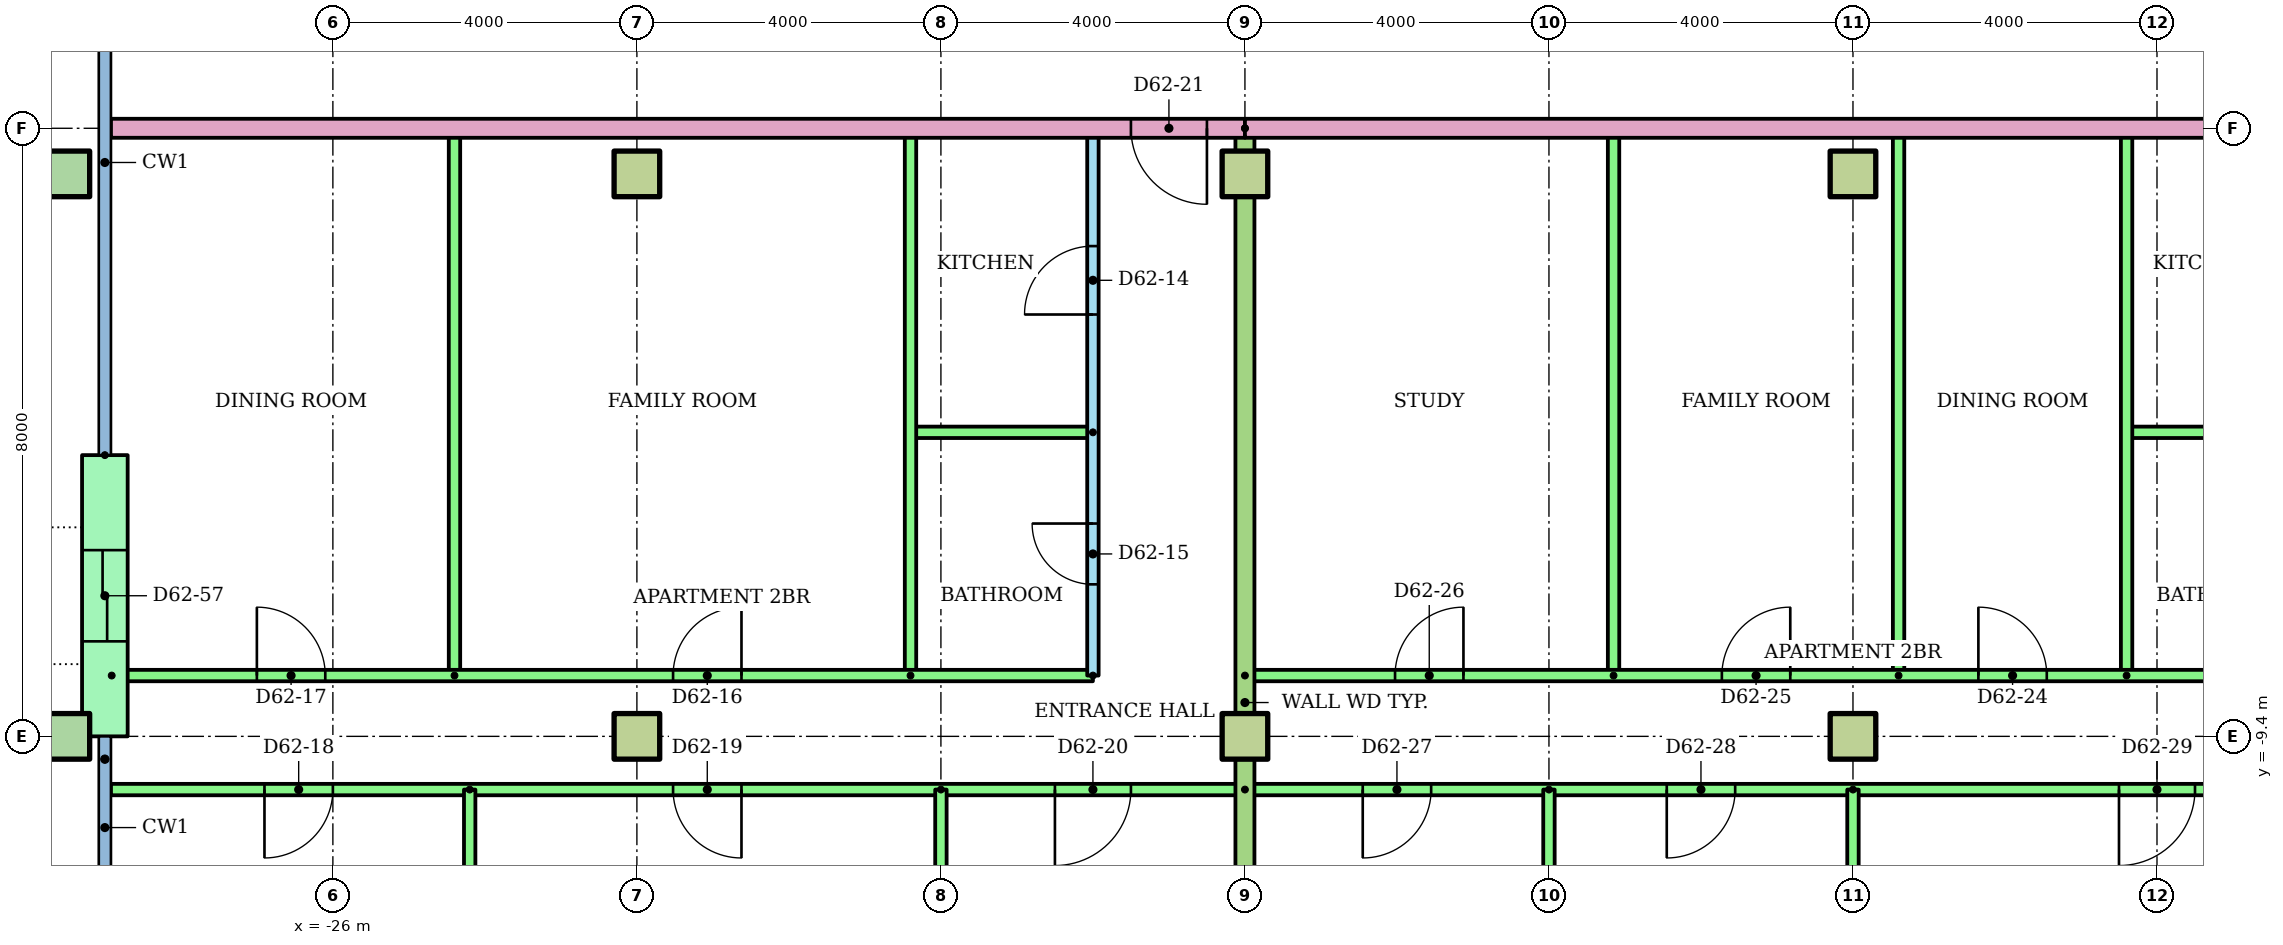
"""IFC4 building model, lengths in metres.
Left out: names, types, materials, properties, quantities, classifications, styles, units other than length and angle.
Written with IfcOpenShell. Run it as: python <this file> out.ifc"""

import sys

from ifc_helpers import new_model, si_unit, direction, frame, frame_2d, origin, origin_2d, place, context, subcontext, project, spatial, rectangle, hollow_rectangle, extrude, element, fill, save


model = new_model("IFC4")
c1 = context("Model", 3, precision=1e-05, world=origin(), true_north=direction((0.0, 1.0)))
c2 = subcontext(c1, "Body", "Model", "MODEL_VIEW")
j1 = project(units=[si_unit("LENGTHUNIT", "METRE"), si_unit("PLANEANGLEUNIT", "RADIAN")], contexts=[c1])
p1 = place(None, origin())
s1 = spatial("IfcSite", under=j1, at=p1, CompositionType="ELEMENT")
p2 = place(p1, origin())
s2 = spatial("IfcBuilding", under=s1, at=p2, CompositionType="ELEMENT")
p3 = place(p2, frame((0.0, 0.0, 236.4)))
s3 = spatial("IfcBuildingStorey", under=s2, at=p3, CompositionType="ELEMENT", Elevation=236.4)
p4 = place(p3, frame((-29.5, -9.4, 0.0)))
e1 = element("IfcColumn", 1, at=p4, inside=s3, PredefinedType="COLUMN", context=c2, shape_type="SweptSolid", body=[
    extrude(hollow_rectangle(XDim=0.6, YDim=0.6, WallThickness=0.03, at=origin_2d()), origin(), (0.0, 0.0, 1.0), 3.2),
])
for number, where in (
    (2, (-22.0, -9.4, 0.0)),
    (3, (-14.0, -9.4, 0.0)),
    (4, (-6.0, -9.4, 0.0)),
):
    element("IfcColumn", number, at=place(p3, frame(where)), inside=s3, PredefinedType="COLUMN", context=c2, shape_type="SweptSolid", body=[
        extrude(rectangle(XDim=0.6, YDim=0.6, at=origin_2d()), origin(), (0.0, 0.0, 1.0), 3.2),
    ])
p5 = place(p3, frame((-29.5, -2.0, 0.0)))
e5 = element("IfcColumn", 5, at=p5, inside=s3, PredefinedType="COLUMN", context=c2, shape_type="SweptSolid", body=[
    extrude(hollow_rectangle(XDim=0.6, YDim=0.6, WallThickness=0.03, at=origin_2d()), origin(), (0.0, 0.0, 1.0), 3.2),
])
for number, where in (
    (6, (-22.0, -2.0, 0.0)),
    (7, (-14.0, -2.0, 0.0)),
    (8, (-6.0, -2.0, 0.0)),
):
    element("IfcColumn", number, at=place(p3, frame(where)), inside=s3, PredefinedType="COLUMN", context=c2, shape_type="SweptSolid", body=[
        extrude(rectangle(XDim=0.6, YDim=0.6, at=origin_2d()), origin(), (0.0, 0.0, 1.0), 3.2),
    ])
p6 = place(p3, frame((-29.0, -5.7, 0.0), z_axis=(0.0, 0.0, 1.0), x_axis=(0.0, -1.0, 0.0)))
e9 = element("IfcWall", 9, at=p6, inside=s3, PredefinedType="STANDARD", context=c2, shape_type="SweptSolid", body=[
    extrude(rectangle(XDim=3.7, YDim=0.6, at=frame_2d((1.85, 0.0))), origin(), (0.0, 0.0, 1.0), 2.8),
])
p7 = place(p6, frame((1.25, 0.0, 0.0)))
e10 = element("IfcOpeningElement", 10, at=p7, cuts=e9, PredefinedType="OPENING", context=c2, shape_type="SweptSolid", body=[
    extrude(rectangle(XDim=1.2, YDim=2.1, at=frame_2d((0.6, 1.05))), frame((0.0, 0.31, 0.0), z_axis=(0.0, -1.0, 0.0), x_axis=(1.0, 0.0, 0.0)), (0.0, 0.0, 1.0), 0.62),
])
p8 = place(p3, frame((-16.0, -8.6, 0.0), z_axis=(0.0, 0.0, 1.0), x_axis=(0.0, 1.0, 0.0)))
e11 = element("IfcWall", 11, at=p8, inside=s3, PredefinedType="PARTITIONING", context=c2, shape_type="SweptSolid", body=[
    extrude(rectangle(XDim=7.2, YDim=0.15, at=frame_2d((3.6, 0.0))), origin(), (0.0, 0.0, 1.0), 2.4),
])
p9 = place(p8, frame((4.75, 0.0, 0.0)))
e12 = element("IfcOpeningElement", 12, at=p9, cuts=e11, PredefinedType="OPENING", context=c2, shape_type="SweptSolid", body=[
    extrude(rectangle(XDim=0.9, YDim=2.1, at=frame_2d((0.45, 1.05))), frame((0.0, 0.085, 0.0), z_axis=(0.0, -1.0, 0.0), x_axis=(1.0, 0.0, 0.0)), (0.0, 0.0, 1.0), 0.17),
])
p10 = place(p8, frame((1.2, 0.0, 0.0)))
e13 = element("IfcOpeningElement", 13, at=p10, cuts=e11, PredefinedType="OPENING", context=c2, shape_type="SweptSolid", body=[
    extrude(rectangle(XDim=0.8, YDim=2.1, at=frame_2d((0.4, 1.05))), frame((0.0, 0.085, 0.0), z_axis=(0.0, -1.0, 0.0), x_axis=(1.0, 0.0, 0.0)), (0.0, 0.0, 1.0), 0.17),
])
p11 = place(p3, frame((-16.0, -5.4, 0.0), z_axis=(0.0, 0.0, 1.0), x_axis=(-1.0, 0.0, 0.0)))
e14 = element("IfcWall", 14, at=p11, inside=s3, PredefinedType="PARTITIONING", context=c2, shape_type="SweptSolid", body=[
    extrude(rectangle(XDim=2.4, YDim=0.15, at=frame_2d((1.2, 0.0))), origin(), (0.0, 0.0, 1.0), 2.4),
])
for number, where, z_axis, x_axis in (
    (15, (-18.4, -8.6, 0.0), (0.0, 0.0, 1.0), (0.0, 1.0, 0.0)),
    (16, (-24.4, -8.6, 0.0), (0.0, 0.0, 1.0), (0.0, 1.0, 0.0)),
):
    element("IfcWall", number, at=place(p3, frame(where, z_axis=z_axis, x_axis=x_axis)), inside=s3, PredefinedType="PARTITIONING", context=c2, shape_type="SweptSolid", body=[
        extrude(rectangle(XDim=7.2, YDim=0.15, at=frame_2d((3.6, 0.0))), origin(), (0.0, 0.0, 1.0), 2.4),
    ])
p12 = place(p3, frame((-28.91, -8.6, 0.0)))
e17 = element("IfcWall", 17, at=p12, inside=s3, PredefinedType="PARTITIONING", context=c2, shape_type="SweptSolid", body=[
    extrude(rectangle(XDim=12.91, YDim=0.15, at=frame_2d((6.455, 0.0))), origin(), (0.0, 0.0, 1.0), 2.4),
])
p13 = place(p12, frame((7.386, 0.0, 0.0)))
e18 = element("IfcOpeningElement", 18, at=p13, cuts=e17, PredefinedType="OPENING", context=c2, shape_type="SweptSolid", body=[
    extrude(rectangle(XDim=0.9, YDim=2.1, at=frame_2d((0.45, 1.05))), frame((0.0, 0.085, 0.0), z_axis=(0.0, -1.0, 0.0), x_axis=(1.0, 0.0, 0.0)), (0.0, 0.0, 1.0), 0.17),
])
p14 = place(p12, frame((1.91, 0.0, 0.0)))
e19 = element("IfcOpeningElement", 19, at=p14, cuts=e17, PredefinedType="OPENING", context=c2, shape_type="SweptSolid", body=[
    extrude(rectangle(XDim=0.9, YDim=2.1, at=frame_2d((0.45, 1.05))), frame((0.0, 0.085, 0.0), z_axis=(0.0, -1.0, 0.0), x_axis=(1.0, 0.0, 0.0)), (0.0, 0.0, 1.0), 0.17),
])
p15 = place(p3, frame((-14.0, -10.1, 0.0), z_axis=(0.0, 0.0, 1.0), x_axis=(-1.0, 0.0, 0.0)))
e20 = element("IfcWall", 20, at=p15, inside=s3, PredefinedType="PARTITIONING", context=c2, shape_type="SweptSolid", body=[
    extrude(rectangle(XDim=14.92, YDim=0.15, at=frame_2d((7.46, 0.0))), origin(), (0.0, 0.0, 1.0), 2.4),
])
p16 = place(p15, frame((12.0, 0.0, 0.0)))
e21 = element("IfcOpeningElement", 21, at=p16, cuts=e20, PredefinedType="OPENING", context=c2, shape_type="SweptSolid", body=[
    extrude(rectangle(XDim=0.9, YDim=2.1, at=frame_2d((0.45, 1.05))), frame((0.0, 0.085, 0.0), z_axis=(0.0, -1.0, 0.0), x_axis=(1.0, 0.0, 0.0)), (0.0, 0.0, 1.0), 0.17),
])
p17 = place(p15, frame((6.624, 0.0, 0.0)))
e22 = element("IfcOpeningElement", 22, at=p17, cuts=e20, PredefinedType="OPENING", context=c2, shape_type="SweptSolid", body=[
    extrude(rectangle(XDim=0.9, YDim=2.1, at=frame_2d((0.45, 1.05))), frame((0.0, 0.085, 0.0), z_axis=(0.0, -1.0, 0.0), x_axis=(1.0, 0.0, 0.0)), (0.0, 0.0, 1.0), 0.17),
])
p18 = place(p15, frame((1.5, 0.0, 0.0)))
e23 = element("IfcOpeningElement", 23, at=p18, cuts=e20, PredefinedType="OPENING", context=c2, shape_type="SweptSolid", body=[
    extrude(rectangle(XDim=1.0, YDim=2.1, at=frame_2d((0.5, 1.05))), frame((0.0, 0.085, 0.0), z_axis=(0.0, -1.0, 0.0), x_axis=(1.0, 0.0, 0.0)), (0.0, 0.0, 1.0), 0.17),
])
p19 = place(p3, frame((-24.2, -10.1, 0.0), z_axis=(0.0, 0.0, 1.0), x_axis=(0.0, -1.0, 0.0)))
e24 = element("IfcWall", 24, at=p19, inside=s3, PredefinedType="PARTITIONING", context=c2, shape_type="SweptSolid", body=[
    extrude(rectangle(XDim=4.62, YDim=0.15, at=frame_2d((2.31, 0.0))), origin(), (0.0, 0.0, 1.0), 2.4),
])
p20 = place(p3, frame((-18.0, -10.1, 0.0), z_axis=(0.0, 0.0, 1.0), x_axis=(0.0, -1.0, 0.0)))
e25 = element("IfcWall", 25, at=p20, inside=s3, PredefinedType="PARTITIONING", context=c2, shape_type="SweptSolid", body=[
    extrude(rectangle(XDim=6.421, YDim=0.15, at=frame_2d((3.21, 0.0))), origin(), (0.0, 0.0, 1.0), 2.4),
])
p21 = place(p3, frame((0.0, -5.4, 0.0), z_axis=(0.0, 0.0, 1.0), x_axis=(-1.0, 0.0, 0.0)))
e26 = element("IfcWall", 26, at=p21, inside=s3, PredefinedType="PARTITIONING", context=c2, shape_type="SweptSolid", body=[
    extrude(rectangle(XDim=2.4, YDim=0.15, at=frame_2d((1.2, 0.0))), origin(), (0.0, 0.0, 1.0), 2.4),
])
for number, where, z_axis, x_axis in (
    (27, (-2.4, -8.6, 0.0), (0.0, 0.0, 1.0), (0.0, 1.0, 0.0)),
    (28, (-5.4, -8.6, 0.0), (0.0, 0.0, 1.0), (0.0, 1.0, 0.0)),
    (29, (-9.15, -8.6, 0.0), (0.0, 0.0, 1.0), (0.0, 1.0, 0.0)),
):
    element("IfcWall", number, at=place(p3, frame(where, z_axis=z_axis, x_axis=x_axis)), inside=s3, PredefinedType="PARTITIONING", context=c2, shape_type="SweptSolid", body=[
        extrude(rectangle(XDim=7.2, YDim=0.15, at=frame_2d((3.6, 0.0))), origin(), (0.0, 0.0, 1.0), 2.4),
    ])
p22 = place(p3, frame((-14.0, -8.6, 0.0)))
e30 = element("IfcWall", 30, at=p22, inside=s3, PredefinedType="PARTITIONING", context=c2, shape_type="SweptSolid", body=[
    extrude(rectangle(XDim=14.0, YDim=0.15, at=frame_2d((7.0, 0.0))), origin(), (0.0, 0.0, 1.0), 2.4),
])
p23 = place(p22, frame((9.65, 0.0, 0.0)))
e31 = element("IfcOpeningElement", 31, at=p23, cuts=e30, PredefinedType="OPENING", context=c2, shape_type="SweptSolid", body=[
    extrude(rectangle(XDim=0.9, YDim=2.1, at=frame_2d((0.45, 1.05))), frame((0.0, 0.085, 0.0), z_axis=(0.0, -1.0, 0.0), x_axis=(1.0, 0.0, 0.0)), (0.0, 0.0, 1.0), 0.17),
])
p24 = place(p22, frame((6.275, 0.0, 0.0)))
e32 = element("IfcOpeningElement", 32, at=p24, cuts=e30, PredefinedType="OPENING", context=c2, shape_type="SweptSolid", body=[
    extrude(rectangle(XDim=0.9, YDim=2.1, at=frame_2d((0.45, 1.05))), frame((0.0, 0.085, 0.0), z_axis=(0.0, -1.0, 0.0), x_axis=(1.0, 0.0, 0.0)), (0.0, 0.0, 1.0), 0.17),
])
p25 = place(p22, frame((1.975, 0.0, 0.0)))
e33 = element("IfcOpeningElement", 33, at=p25, cuts=e30, PredefinedType="OPENING", context=c2, shape_type="SweptSolid", body=[
    extrude(rectangle(XDim=0.9, YDim=2.1, at=frame_2d((0.45, 1.05))), frame((0.0, 0.085, 0.0), z_axis=(0.0, -1.0, 0.0), x_axis=(1.0, 0.0, 0.0)), (0.0, 0.0, 1.0), 0.17),
])
p26 = place(p3, frame((2.0, -10.1, 0.0), z_axis=(0.0, 0.0, 1.0), x_axis=(-1.0, 0.0, 0.0)))
e34 = element("IfcWall", 34, at=p26, inside=s3, PredefinedType="PARTITIONING", context=c2, shape_type="SweptSolid", body=[
    extrude(rectangle(XDim=16.0, YDim=0.15, at=frame_2d((8.0, 0.0))), origin(), (0.0, 0.0, 1.0), 2.4),
])
p27 = place(p26, frame((13.55, 0.0, 0.0)))
e35 = element("IfcOpeningElement", 35, at=p27, cuts=e34, PredefinedType="OPENING", context=c2, shape_type="SweptSolid", body=[
    extrude(rectangle(XDim=0.9, YDim=2.1, at=frame_2d((0.45, 1.05))), frame((0.0, 0.085, 0.0), z_axis=(0.0, -1.0, 0.0), x_axis=(1.0, 0.0, 0.0)), (0.0, 0.0, 1.0), 0.17),
])
p28 = place(p26, frame((9.55, 0.0, 0.0)))
e36 = element("IfcOpeningElement", 36, at=p28, cuts=e34, PredefinedType="OPENING", context=c2, shape_type="SweptSolid", body=[
    extrude(rectangle(XDim=0.9, YDim=2.1, at=frame_2d((0.45, 1.05))), frame((0.0, 0.085, 0.0), z_axis=(0.0, -1.0, 0.0), x_axis=(1.0, 0.0, 0.0)), (0.0, 0.0, 1.0), 0.17),
])
p29 = place(p26, frame((3.5, 0.0, 0.0)))
e37 = element("IfcOpeningElement", 37, at=p29, cuts=e34, PredefinedType="OPENING", context=c2, shape_type="SweptSolid", body=[
    extrude(rectangle(XDim=1.0, YDim=2.1, at=frame_2d((0.5, 1.05))), frame((0.0, 0.085, 0.0), z_axis=(0.0, -1.0, 0.0), x_axis=(1.0, 0.0, 0.0)), (0.0, 0.0, 1.0), 0.17),
])
p30 = place(p3, frame((-10.0, -10.1, 0.0), z_axis=(0.0, 0.0, 1.0), x_axis=(0.0, -1.0, 0.0)))
e38 = element("IfcWall", 38, at=p30, inside=s3, PredefinedType="PARTITIONING", context=c2, shape_type="SweptSolid", body=[
    extrude(rectangle(XDim=6.421, YDim=0.15, at=frame_2d((3.21, 0.0))), origin(), (0.0, 0.0, 1.0), 2.4),
])
p31 = place(p3, frame((-6.0, -10.1, 0.0), z_axis=(0.0, 0.0, 1.0), x_axis=(0.0, -1.0, 0.0)))
e39 = element("IfcWall", 39, at=p31, inside=s3, PredefinedType="PARTITIONING", context=c2, shape_type="SweptSolid", body=[
    extrude(rectangle(XDim=6.41, YDim=0.15, at=frame_2d((3.205, 0.0))), origin(), (0.0, 0.0, 1.0), 2.4),
])
p32 = place(p3, frame((-14.0, -1.4, 0.0), z_axis=(0.0, 0.0, 1.0), x_axis=(0.0, -1.0, 0.0)))
e40 = element("IfcWall", 40, at=p32, inside=s3, PredefinedType="PARTITIONING", context=c2, shape_type="SweptSolid", body=[
    extrude(rectangle(XDim=15.11, YDim=0.25, at=frame_2d((7.555, 0.0))), origin(), (0.0, 0.0, 1.0), 2.4),
])
p33 = place(p3, frame((-14.0, -1.4, 0.0), z_axis=(0.0, 0.0, 1.0), x_axis=(-1.0, 0.0, 0.0)))
e41 = element("IfcWall", 41, at=p33, inside=s3, PredefinedType="PARTITIONING", context=c2, shape_type="SweptSolid", body=[
    extrude(rectangle(XDim=14.92, YDim=0.25, at=frame_2d((7.46, 0.0))), origin(), (0.0, 0.0, 1.0), 2.4),
])
p34 = place(p33, frame((0.5, 0.0, 0.0)))
e42 = element("IfcOpeningElement", 42, at=p34, cuts=e41, PredefinedType="OPENING", context=c2, shape_type="SweptSolid", body=[
    extrude(rectangle(XDim=1.0, YDim=2.1, at=frame_2d((0.5, 1.05))), frame((0.0, 0.135, 0.0), z_axis=(0.0, -1.0, 0.0), x_axis=(1.0, 0.0, 0.0)), (0.0, 0.0, 1.0), 0.27),
])
p35 = place(p3, frame((14.0, -1.4, 0.0), z_axis=(0.0, 0.0, 1.0), x_axis=(-1.0, 0.0, 0.0)))
e43 = element("IfcWall", 43, at=p35, inside=s3, PredefinedType="PARTITIONING", context=c2, shape_type="SweptSolid", body=[
    extrude(rectangle(XDim=28.0, YDim=0.25, at=frame_2d((14.0, 0.0))), origin(), (0.0, 0.0, 1.0), 2.4),
])
p36 = place(p35, frame((12.5, 0.0, 0.0)))
e44 = element("IfcOpeningElement", 44, at=p36, cuts=e43, PredefinedType="OPENING", context=c2, shape_type="SweptSolid", body=[
    extrude(rectangle(XDim=1.0, YDim=2.1, at=frame_2d((0.5, 1.05))), frame((0.0, 0.135, 0.0), z_axis=(0.0, -1.0, 0.0), x_axis=(1.0, 0.0, 0.0)), (0.0, 0.0, 1.0), 0.27),
])
p37 = place(p35, frame((10.5, 0.0, 0.0)))
e45 = element("IfcOpeningElement", 45, at=p37, cuts=e43, PredefinedType="OPENING", context=c2, shape_type="SweptSolid", body=[
    extrude(rectangle(XDim=1.0, YDim=2.1, at=frame_2d((0.5, 1.05))), frame((0.0, 0.135, 0.0), z_axis=(0.0, -1.0, 0.0), x_axis=(1.0, 0.0, 0.0)), (0.0, 0.0, 1.0), 0.27),
])
p38 = place(p9, origin())
e46 = element("IfcDoor", 46, at=p38, inside=s3, OperationType="SINGLE_SWING_LEFT", PredefinedType="DOOR", context=c2, shape_type="SweptSolid", body=[
    extrude(rectangle(XDim=0.9, YDim=2.1, at=frame_2d((0.45, 1.05))), frame((0.0, 0.025, 0.0), z_axis=(0.0, -1.0, 0.0), x_axis=(1.0, 0.0, 0.0)), (0.0, 0.0, 1.0), 0.05),
])
fill(e12, e46)
p39 = place(p10, origin())
e47 = element("IfcDoor", 47, at=p39, inside=s3, OperationType="SINGLE_SWING_RIGHT", PredefinedType="DOOR", context=c2, shape_type="SweptSolid", body=[
    extrude(rectangle(XDim=0.8, YDim=2.1, at=frame_2d((0.4, 1.05))), frame((0.0, 0.025, 0.0), z_axis=(0.0, -1.0, 0.0), x_axis=(1.0, 0.0, 0.0)), (0.0, 0.0, 1.0), 0.05),
])
fill(e13, e47)
p40 = place(p13, origin())
e48 = element("IfcDoor", 48, at=p40, inside=s3, OperationType="SINGLE_SWING_RIGHT", PredefinedType="DOOR", context=c2, shape_type="SweptSolid", body=[
    extrude(rectangle(XDim=0.9, YDim=2.1, at=frame_2d((0.45, 1.05))), frame((0.0, 0.025, 0.0), z_axis=(0.0, -1.0, 0.0), x_axis=(1.0, 0.0, 0.0)), (0.0, 0.0, 1.0), 0.05),
])
fill(e18, e48)
p41 = place(p14, origin())
e49 = element("IfcDoor", 49, at=p41, inside=s3, OperationType="SINGLE_SWING_LEFT", PredefinedType="DOOR", context=c2, shape_type="SweptSolid", body=[
    extrude(rectangle(XDim=0.9, YDim=2.1, at=frame_2d((0.45, 1.05))), frame((0.0, 0.025, 0.0), z_axis=(0.0, -1.0, 0.0), x_axis=(1.0, 0.0, 0.0)), (0.0, 0.0, 1.0), 0.05),
])
fill(e19, e49)
p42 = place(p16, origin())
e50 = element("IfcDoor", 50, at=p42, inside=s3, OperationType="SINGLE_SWING_RIGHT", PredefinedType="DOOR", context=c2, shape_type="SweptSolid", body=[
    extrude(rectangle(XDim=0.9, YDim=2.1, at=frame_2d((0.45, 1.05))), frame((0.0, 0.025, 0.0), z_axis=(0.0, -1.0, 0.0), x_axis=(1.0, 0.0, 0.0)), (0.0, 0.0, 1.0), 0.05),
])
fill(e21, e50)
p43 = place(p17, origin())
e51 = element("IfcDoor", 51, at=p43, inside=s3, OperationType="SINGLE_SWING_LEFT", PredefinedType="DOOR", context=c2, shape_type="SweptSolid", body=[
    extrude(rectangle(XDim=0.9, YDim=2.1, at=frame_2d((0.45, 1.05))), frame((0.0, 0.025, 0.0), z_axis=(0.0, -1.0, 0.0), x_axis=(1.0, 0.0, 0.0)), (0.0, 0.0, 1.0), 0.05),
])
fill(e22, e51)
p44 = place(p18, origin())
e52 = element("IfcDoor", 52, at=p44, inside=s3, OperationType="SINGLE_SWING_RIGHT", PredefinedType="DOOR", context=c2, shape_type="SweptSolid", body=[
    extrude(rectangle(XDim=1.0, YDim=2.1, at=frame_2d((0.5, 1.05))), frame((0.0, 0.025, 0.0), z_axis=(0.0, -1.0, 0.0), x_axis=(1.0, 0.0, 0.0)), (0.0, 0.0, 1.0), 0.05),
])
fill(e23, e52)
p45 = place(p34, origin())
e53 = element("IfcDoor", 53, at=p45, inside=s3, OperationType="SINGLE_SWING_LEFT", PredefinedType="DOOR", context=c2, shape_type="SweptSolid", body=[
    extrude(rectangle(XDim=1.0, YDim=2.1, at=frame_2d((0.5, 1.05))), frame((0.0, 0.025, 0.0), z_axis=(0.0, -1.0, 0.0), x_axis=(1.0, 0.0, 0.0)), (0.0, 0.0, 1.0), 0.05),
])
fill(e42, e53)
p46 = place(p23, origin())
e54 = element("IfcDoor", 54, at=p46, inside=s3, OperationType="SINGLE_SWING_LEFT", PredefinedType="DOOR", context=c2, shape_type="SweptSolid", body=[
    extrude(rectangle(XDim=0.9, YDim=2.1, at=frame_2d((0.45, 1.05))), frame((0.0, 0.025, 0.0), z_axis=(0.0, -1.0, 0.0), x_axis=(1.0, 0.0, 0.0)), (0.0, 0.0, 1.0), 0.05),
])
fill(e31, e54)
p47 = place(p24, origin())
e55 = element("IfcDoor", 55, at=p47, inside=s3, OperationType="SINGLE_SWING_RIGHT", PredefinedType="DOOR", context=c2, shape_type="SweptSolid", body=[
    extrude(rectangle(XDim=0.9, YDim=2.1, at=frame_2d((0.45, 1.05))), frame((0.0, 0.025, 0.0), z_axis=(0.0, -1.0, 0.0), x_axis=(1.0, 0.0, 0.0)), (0.0, 0.0, 1.0), 0.05),
])
fill(e32, e55)
p48 = place(p25, origin())
e56 = element("IfcDoor", 56, at=p48, inside=s3, OperationType="SINGLE_SWING_RIGHT", PredefinedType="DOOR", context=c2, shape_type="SweptSolid", body=[
    extrude(rectangle(XDim=0.9, YDim=2.1, at=frame_2d((0.45, 1.05))), frame((0.0, 0.025, 0.0), z_axis=(0.0, -1.0, 0.0), x_axis=(1.0, 0.0, 0.0)), (0.0, 0.0, 1.0), 0.05),
])
fill(e33, e56)
p49 = place(p27, origin())
e57 = element("IfcDoor", 57, at=p49, inside=s3, OperationType="SINGLE_SWING_RIGHT", PredefinedType="DOOR", context=c2, shape_type="SweptSolid", body=[
    extrude(rectangle(XDim=0.9, YDim=2.1, at=frame_2d((0.45, 1.05))), frame((0.0, 0.025, 0.0), z_axis=(0.0, -1.0, 0.0), x_axis=(1.0, 0.0, 0.0)), (0.0, 0.0, 1.0), 0.05),
])
fill(e35, e57)
p50 = place(p28, origin())
e58 = element("IfcDoor", 58, at=p50, inside=s3, OperationType="SINGLE_SWING_RIGHT", PredefinedType="DOOR", context=c2, shape_type="SweptSolid", body=[
    extrude(rectangle(XDim=0.9, YDim=2.1, at=frame_2d((0.45, 1.05))), frame((0.0, 0.025, 0.0), z_axis=(0.0, -1.0, 0.0), x_axis=(1.0, 0.0, 0.0)), (0.0, 0.0, 1.0), 0.05),
])
fill(e36, e58)
p51 = place(p29, origin())
e59 = element("IfcDoor", 59, at=p51, inside=s3, OperationType="SINGLE_SWING_RIGHT", PredefinedType="DOOR", context=c2, shape_type="SweptSolid", body=[
    extrude(rectangle(XDim=1.0, YDim=2.1, at=frame_2d((0.5, 1.05))), frame((0.0, 0.025, 0.0), z_axis=(0.0, -1.0, 0.0), x_axis=(1.0, 0.0, 0.0)), (0.0, 0.0, 1.0), 0.05),
])
fill(e37, e59)
p52 = place(p7, origin())
e60 = element("IfcDoor", 60, at=p52, inside=s3, OperationType="SLIDING_TO_LEFT", PredefinedType="DOOR", context=c2, shape_type="SweptSolid", body=[
    extrude(rectangle(XDim=1.2, YDim=2.1, at=frame_2d((0.6, 1.05))), frame((0.0, 0.025, 0.0), z_axis=(0.0, -1.0, 0.0), x_axis=(1.0, 0.0, 0.0)), (0.0, 0.0, 1.0), 0.05),
])
fill(e10, e60)
save(model, sys.argv[1])
